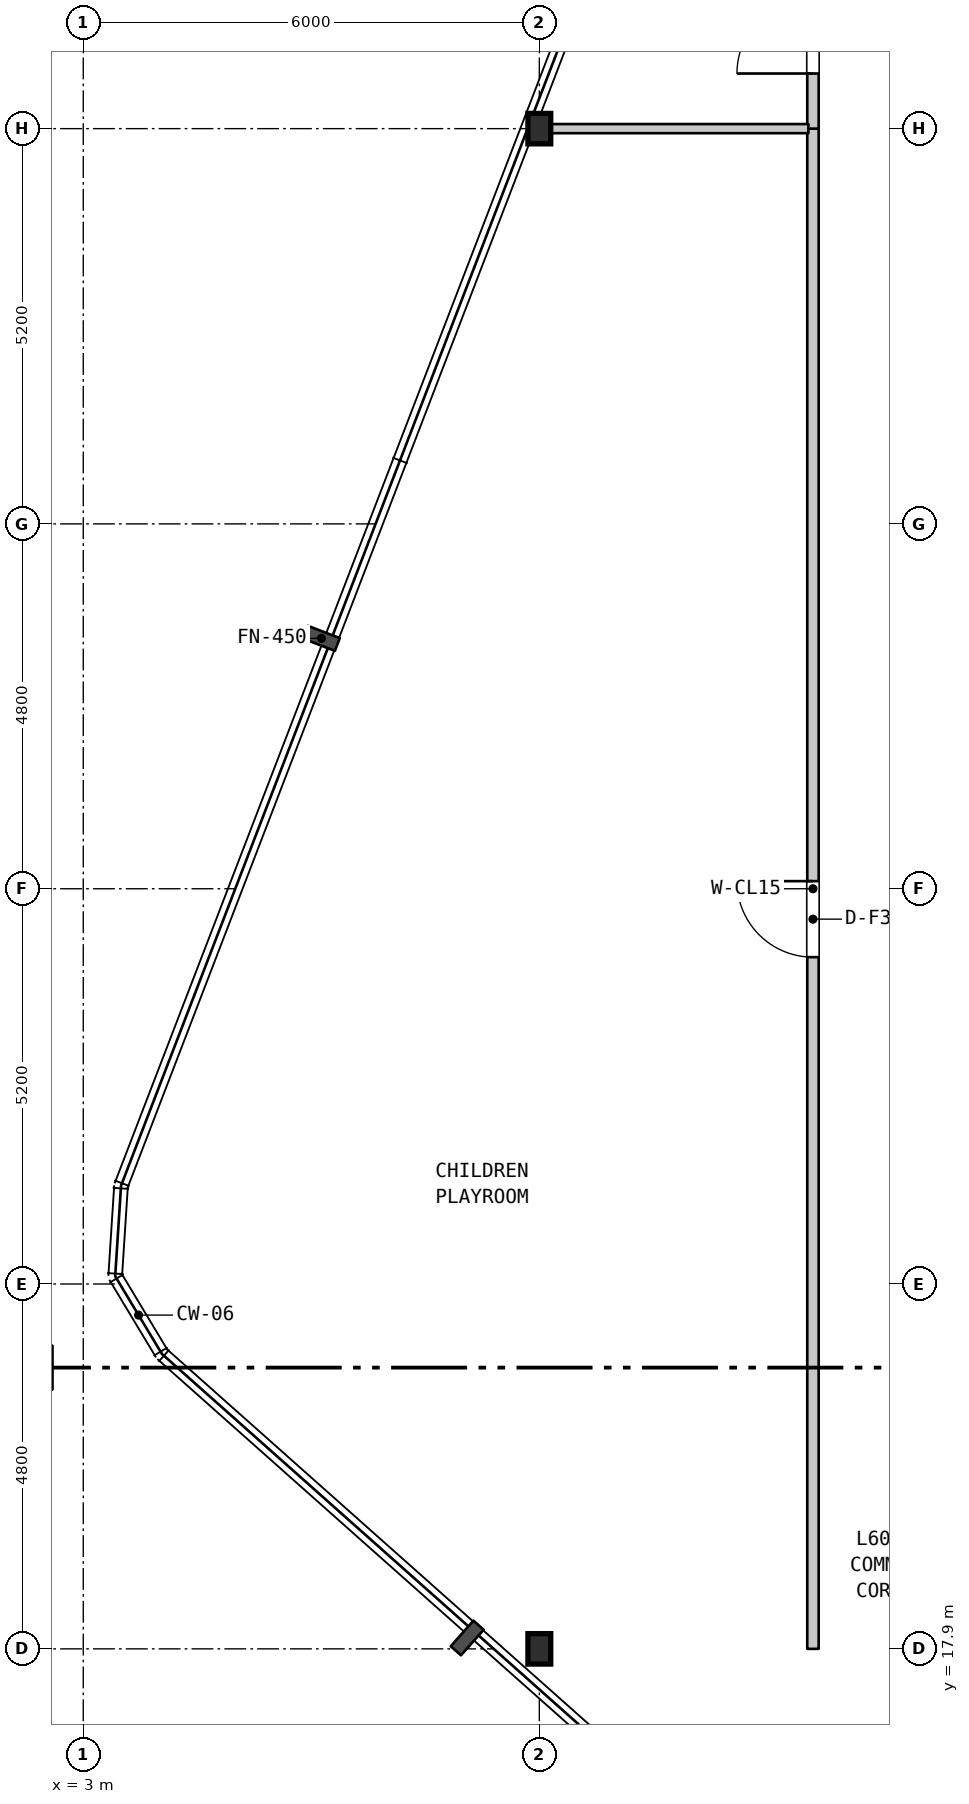
"""IFC4 building model, lengths in metres.
Left out: names, types, materials, properties, quantities, classifications, styles, units other than length and angle.
Written with IfcOpenShell. Run it as: python <this file> out.ifc"""

import sys

from ifc_helpers import new_model, si_unit, direction, frame, frame_2d, origin, origin_2d, place, context, subcontext, project, spatial, rectangle, i_section, extrude, element, fill, save


model = new_model("IFC4")
c1 = context("Model", 3, precision=1e-05, world=origin(), true_north=direction((0.0, 1.0)))
c2 = subcontext(c1, "Body", "Model", "MODEL_VIEW")
j1 = project(units=[si_unit("LENGTHUNIT", "METRE"), si_unit("PLANEANGLEUNIT", "RADIAN")], contexts=[c1])
p1 = place(None, origin())
s1 = spatial("IfcSite", under=j1, at=p1, CompositionType="ELEMENT")
p2 = place(p1, origin())
s2 = spatial("IfcBuilding", under=s1, at=p2, CompositionType="ELEMENT")
p3 = place(p2, frame((0.0, 0.0, 242.8)))
s3 = spatial("IfcBuildingStorey", under=s2, at=p3, CompositionType="ELEMENT", Elevation=242.8)
for number, where, z_axis, x_axis in (
    (1, (9.0, 17.9, 0.0), (0.0, 0.0, 1.0), (1.0, 0.0, 0.0)),
    (2, (9.0, 37.9, 0.0), (0.0, 0.0, 1.0), (1.0, 0.0, 0.0)),
):
    element("IfcColumn", number, at=place(p3, frame(where, z_axis=z_axis, x_axis=x_axis)), inside=s3, PredefinedType="COLUMN", context=c2, shape_type="SweptSolid", body=[
        extrude(i_section(OverallWidth=0.3, OverallDepth=0.4, WebThickness=0.013, FlangeThickness=0.024, FilletRadius=0.027, at=origin_2d()), origin(), (0.0, 0.0, 1.0), 4.5),
    ])
p4 = place(p3, frame((12.6, 17.9, 0.0), z_axis=(0.0, 0.0, 1.0), x_axis=(0.0, 1.0, 0.0)))
e3 = element("IfcWall", 3, at=p4, inside=s3, PredefinedType="STANDARD", context=c2, shape_type="SweptSolid", body=[
    extrude(rectangle(XDim=20.0, YDim=0.15, at=frame_2d((10.0, 0.0))), origin(), (0.0, 0.0, 1.0), 4.19),
])
p5 = place(p4, frame((9.1, 0.0, 0.0)))
e4 = element("IfcOpeningElement", 4, at=p5, cuts=e3, PredefinedType="OPENING", context=c2, shape_type="SweptSolid", body=[
    extrude(rectangle(XDim=1.0, YDim=2.15, at=frame_2d((0.5, 1.075))), frame((0.0, 0.085, 0.0), z_axis=(0.0, -1.0, 0.0), x_axis=(1.0, 0.0, 0.0)), (0.0, 0.0, 1.0), 0.17),
])
p6 = place(p3, frame((12.6, 37.9, 0.0), z_axis=(0.0, 0.0, 1.0), x_axis=(0.0, 1.0, 0.0)))
e5 = element("IfcWall", 5, at=p6, inside=s3, PredefinedType="STANDARD", context=c2, shape_type="SweptSolid", body=[
    extrude(rectangle(XDim=2.4, YDim=0.15, at=frame_2d((1.2, 0.0))), origin(), (0.0, 0.0, 1.0), 4.19),
])
p7 = place(p6, frame((0.725, 0.0, 0.0)))
e6 = element("IfcOpeningElement", 6, at=p7, cuts=e5, PredefinedType="OPENING", context=c2, shape_type="SweptSolid", body=[
    extrude(rectangle(XDim=1.0, YDim=2.15, at=frame_2d((0.5, 1.075))), frame((0.0, 0.085, 0.0), z_axis=(0.0, -1.0, 0.0), x_axis=(1.0, 0.0, 0.0)), (0.0, 0.0, 1.0), 0.17),
])
p8 = place(p3, frame((8.856, 37.9, 0.0), z_axis=(0.0, 0.0, 1.0), x_axis=(1.0, 0.0, 0.0)))
e7 = element("IfcWall", 7, at=p8, inside=s3, PredefinedType="PARTITIONING", context=c2, shape_type="SweptSolid", body=[
    extrude(rectangle(XDim=3.684, YDim=0.12, at=frame_2d((1.842, 0.0))), origin(), (0.0, 0.0, 1.0), 3.84),
])
p9 = place(p5, origin())
e8 = element("IfcDoor", 8, at=p9, inside=s3, OperationType="SINGLE_SWING_RIGHT", PredefinedType="DOOR", context=c2, shape_type="SweptSolid", body=[
    extrude(rectangle(XDim=1.0, YDim=2.15, at=frame_2d((0.5, 1.075))), frame((0.0, 0.025, 0.0), z_axis=(0.0, -1.0, 0.0), x_axis=(1.0, 0.0, 0.0)), (0.0, 0.0, 1.0), 0.05),
])
fill(e4, e8)
p10 = place(p7, origin())
e9 = element("IfcDoor", 9, at=p10, inside=s3, OperationType="SINGLE_SWING_LEFT", PredefinedType="DOOR", context=c2, shape_type="SweptSolid", body=[
    extrude(rectangle(XDim=1.0, YDim=2.15, at=frame_2d((0.5, 1.075))), frame((0.0, 0.025, 0.0), z_axis=(0.0, -1.0, 0.0), x_axis=(1.0, 0.0, 0.0)), (0.0, 0.0, 1.0), 0.05),
])
fill(e6, e9)
save(model, sys.argv[1])
